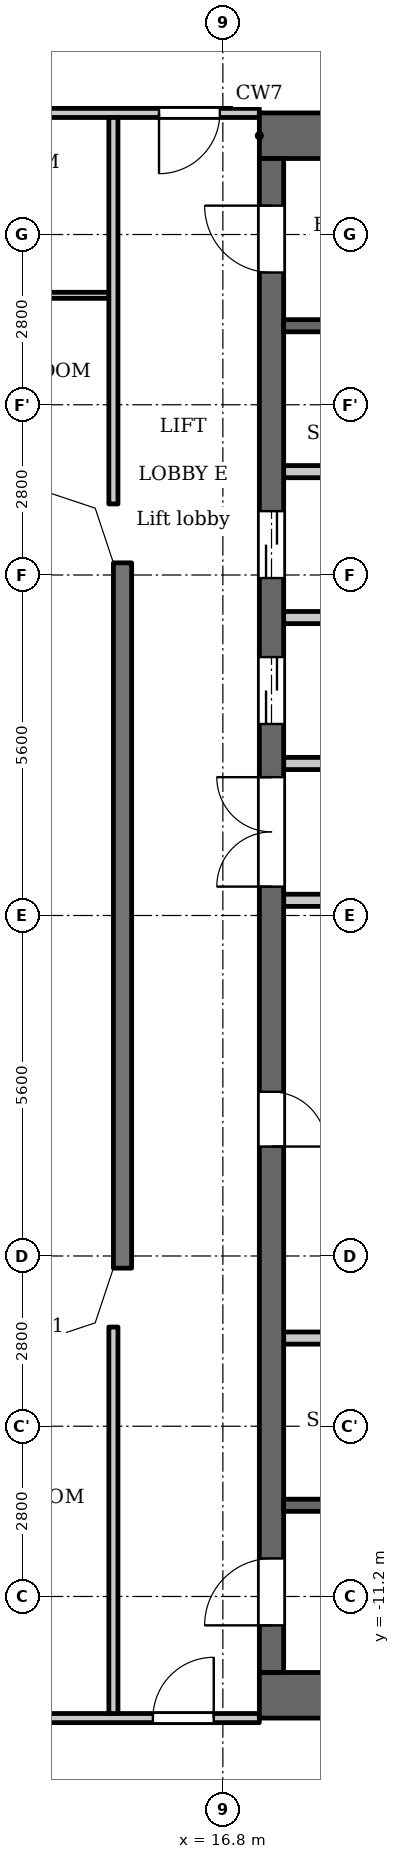
"""IFC4 building model, lengths in metres.
Left out: names, types, materials, properties, quantities, classifications, styles, units other than length and angle.
Written with IfcOpenShell. Run it as: python <this file> out.ifc"""

import sys

from ifc_helpers import new_model, si_unit, direction, frame, frame_2d, origin, place, context, subcontext, project, spatial, polyline, rectangle, outline, extrude, element, fill, save


model = new_model("IFC4")
c1 = context("Model", 3, precision=1e-05, world=origin(), true_north=direction((0.0, 1.0)))
c2 = subcontext(c1, "Body", "Model", "MODEL_VIEW")
j1 = project(units=[si_unit("LENGTHUNIT", "METRE"), si_unit("PLANEANGLEUNIT", "RADIAN")], contexts=[c1])
p1 = place(None, origin())
s1 = spatial("IfcSite", under=j1, at=p1, CompositionType="ELEMENT")
p2 = place(p1, origin())
s2 = spatial("IfcBuilding", under=s1, at=p2, CompositionType="ELEMENT")
p3 = place(p2, frame((0.0, 0.0, 213.4)))
s3 = spatial("IfcBuildingStorey", under=s2, at=p3, CompositionType="ELEMENT", Elevation=213.4)
p4 = place(p3, frame((15.15, 5.8, 0.0), z_axis=(0.0, 0.0, 1.0), x_axis=(0.0, -1.0, 0.0)))
e1 = element("IfcWall", 1, at=p4, inside=s3, PredefinedType="SOLIDWALL", context=c2, shape_type="SweptSolid", body=[
    extrude(rectangle(XDim=11.6, YDim=0.3, at=frame_2d((5.8, 0.0))), origin(), (0.0, 0.0, 1.0), 3.2),
])
for number, where, z_axis, x_axis in (
    (2, (17.4, 12.825, 0.0), (0.0, 0.0, 1.0), (1.0, 0.0, 0.0)),
    (3, (17.4, -12.825, 0.0), (0.0, 0.0, 1.0), (1.0, 0.0, 0.0)),
):
    element("IfcWall", number, at=place(p3, frame(where, z_axis=z_axis, x_axis=x_axis)), inside=s3, PredefinedType="SHEAR", context=c2, shape_type="SweptSolid", body=[
        extrude(rectangle(XDim=7.6, YDim=0.75, at=frame_2d((3.8, 0.0))), origin(), (0.0, 0.0, 1.0), 3.2),
    ])
p5 = place(p3, frame((17.6, -12.45, 0.0), z_axis=(0.0, 0.0, 1.0), x_axis=(0.0, 1.0, 0.0)))
e4 = element("IfcWall", 4, at=p5, inside=s3, PredefinedType="SHEAR", context=c2, shape_type="SweptSolid", body=[
    extrude(rectangle(XDim=24.9, YDim=0.4, at=frame_2d((12.45, 0.0))), origin(), (0.0, 0.0, 1.0), 3.2),
])
p6 = place(p5, frame((8.65, 0.0, 0.0)))
e5 = element("IfcOpeningElement", 5, at=p6, cuts=e4, PredefinedType="OPENING", context=c2, shape_type="SweptSolid", body=[
    extrude(rectangle(XDim=0.9, YDim=2.1, at=frame_2d((0.45, 1.05))), frame((0.0, 0.21, 0.0), z_axis=(0.0, -1.0, 0.0), x_axis=(1.0, 0.0, 0.0)), (0.0, 0.0, 1.0), 0.42),
])
p7 = place(p5, frame((15.6, 0.0, 0.0)))
e6 = element("IfcOpeningElement", 6, at=p7, cuts=e4, PredefinedType="OPENING", context=c2, shape_type="SweptSolid", body=[
    extrude(rectangle(XDim=1.1, YDim=2.1, at=frame_2d((0.55, 1.05))), frame((0.0, 0.21, 0.0), z_axis=(0.0, -1.0, 0.0), x_axis=(1.0, 0.0, 0.0)), (0.0, 0.0, 1.0), 0.42),
])
p8 = place(p5, frame((18.0, 0.0, 0.0)))
e7 = element("IfcOpeningElement", 7, at=p8, cuts=e4, PredefinedType="OPENING", context=c2, shape_type="SweptSolid", body=[
    extrude(rectangle(XDim=1.1, YDim=2.1, at=frame_2d((0.55, 1.05))), frame((0.0, 0.21, 0.0), z_axis=(0.0, -1.0, 0.0), x_axis=(1.0, 0.0, 0.0)), (0.0, 0.0, 1.0), 0.42),
])
p9 = place(p5, frame((23.025, 0.0, 0.0)))
e8 = element("IfcOpeningElement", 8, at=p9, cuts=e4, PredefinedType="OPENING", context=c2, shape_type="SweptSolid", body=[
    extrude(rectangle(XDim=1.1, YDim=2.1, at=frame_2d((0.55, 1.05))), frame((0.0, 0.21, 0.0), z_axis=(0.0, -1.0, 0.0), x_axis=(1.0, 0.0, 0.0)), (0.0, 0.0, 1.0), 0.42),
])
p10 = place(p5, frame((0.775, 0.0, 0.0)))
e9 = element("IfcOpeningElement", 9, at=p10, cuts=e4, PredefinedType="OPENING", context=c2, shape_type="SweptSolid", body=[
    extrude(rectangle(XDim=1.1, YDim=2.1, at=frame_2d((0.55, 1.05))), frame((0.0, 0.21, 0.0), z_axis=(0.0, -1.0, 0.0), x_axis=(1.0, 0.0, 0.0)), (0.0, 0.0, 1.0), 0.42),
])
p11 = place(p5, frame((12.925, 0.0, 0.0)))
e10 = element("IfcOpeningElement", 10, at=p11, cuts=e4, PredefinedType="OPENING", context=c2, shape_type="SweptSolid", body=[
    extrude(rectangle(XDim=1.8, YDim=2.1, at=frame_2d((0.9, 1.05))), frame((0.0, 0.21, 0.0), z_axis=(0.0, -1.0, 0.0), x_axis=(1.0, 0.0, 0.0)), (0.0, 0.0, 1.0), 0.42),
])
p12 = place(p3, frame((17.8, -9.7, 0.0), z_axis=(0.0, 0.0, 1.0), x_axis=(1.0, 0.0, 0.0)))
e11 = element("IfcWall", 11, at=p12, inside=s3, PredefinedType="SHEAR", context=c2, shape_type="SweptSolid", body=[
    extrude(rectangle(XDim=5.65, YDim=0.2, at=frame_2d((2.825, 0.0))), origin(), (0.0, 0.0, 1.0), 3.2),
])
p13 = place(p12, frame((0.85, 0.0, 0.0)))
e12 = element("IfcOpeningElement", 12, at=p13, cuts=e11, PredefinedType="OPENING", context=c2, shape_type="SweptSolid", body=[
    extrude(rectangle(XDim=1.1, YDim=2.1, at=frame_2d((0.55, 1.05))), frame((0.0, 0.11, 0.0), z_axis=(0.0, -1.0, 0.0), x_axis=(1.0, 0.0, 0.0)), (0.0, 0.0, 1.0), 0.22),
])
p14 = place(p12, frame((3.75, 0.0, 0.0)))
e13 = element("IfcOpeningElement", 13, at=p14, cuts=e11, PredefinedType="OPENING", context=c2, shape_type="SweptSolid", body=[
    extrude(rectangle(XDim=1.1, YDim=2.1, at=frame_2d((0.55, 1.05))), frame((0.0, 0.11, 0.0), z_axis=(0.0, -1.0, 0.0), x_axis=(1.0, 0.0, 0.0)), (0.0, 0.0, 1.0), 0.22),
])
p15 = place(p3, frame((17.8, -6.95, 0.0), z_axis=(0.0, 0.0, 1.0), x_axis=(1.0, 0.0, 0.0)))
e14 = element("IfcWall", 14, at=p15, inside=s3, PredefinedType="PARTITIONING", context=c2, shape_type="SweptSolid", body=[
    extrude(rectangle(XDim=2.8, YDim=0.2, at=frame_2d((1.4, 0.0))), origin(), (0.0, 0.0, 1.0), 3.2),
])
p16 = place(p3, frame((17.8, 0.25, 0.0), z_axis=(0.0, 0.0, 1.0), x_axis=(1.0, 0.0, 0.0)))
e15 = element("IfcWall", 15, at=p16, inside=s3, PredefinedType="PARTITIONING", context=c2, shape_type="SweptSolid", body=[
    extrude(rectangle(XDim=3.0, YDim=0.2, at=frame_2d((1.5, 0.0))), origin(), (0.0, 0.0, 1.0), 3.2),
])
p17 = place(p16, frame((1.98, 0.0, 0.0)))
e16 = element("IfcOpeningElement", 16, at=p17, cuts=e15, PredefinedType="OPENING", context=c2, shape_type="SweptSolid", body=[
    extrude(rectangle(XDim=0.9, YDim=2.1, at=frame_2d((0.45, 1.05))), frame((0.0, 0.11, 0.0), z_axis=(0.0, -1.0, 0.0), x_axis=(1.0, 0.0, 0.0)), (0.0, 0.0, 1.0), 0.22),
])
p18 = place(p3, frame((17.8, 2.5, 0.0), z_axis=(0.0, 0.0, 1.0), x_axis=(1.0, 0.0, 0.0)))
e17 = element("IfcWall", 17, at=p18, inside=s3, PredefinedType="PARTITIONING", context=c2, shape_type="SweptSolid", body=[
    extrude(rectangle(XDim=3.0, YDim=0.2, at=frame_2d((1.5, 0.0))), origin(), (0.0, 0.0, 1.0), 3.2),
])
for number, where, z_axis, x_axis in (
    (18, (17.8, 4.9, 0.0), (0.0, 0.0, 1.0), (1.0, 0.0, 0.0)),
    (19, (17.8, 7.3, 0.0), (0.0, 0.0, 1.0), (1.0, 0.0, 0.0)),
):
    element("IfcWall", number, at=place(p3, frame(where, z_axis=z_axis, x_axis=x_axis)), inside=s3, PredefinedType="PARTITIONING", context=c2, shape_type="SweptSolid", body=[
        extrude(rectangle(XDim=2.8, YDim=0.2, at=frame_2d((1.4, 0.0))), origin(), (0.0, 0.0, 1.0), 3.2),
    ])
p19 = place(p3, frame((17.8, 9.7, 0.0), z_axis=(0.0, 0.0, 1.0), x_axis=(1.0, 0.0, 0.0)))
e20 = element("IfcWall", 20, at=p19, inside=s3, PredefinedType="SHEAR", context=c2, shape_type="SweptSolid", body=[
    extrude(rectangle(XDim=5.65, YDim=0.2, at=frame_2d((2.825, 0.0))), origin(), (0.0, 0.0, 1.0), 3.2),
])
p20 = place(p19, frame((0.85, 0.0, 0.0)))
e21 = element("IfcOpeningElement", 21, at=p20, cuts=e20, PredefinedType="OPENING", context=c2, shape_type="SweptSolid", body=[
    extrude(rectangle(XDim=1.1, YDim=2.1, at=frame_2d((0.55, 1.05))), frame((0.0, 0.11, 0.0), z_axis=(0.0, -1.0, 0.0), x_axis=(1.0, 0.0, 0.0)), (0.0, 0.0, 1.0), 0.22),
])
p21 = place(p19, frame((3.75, 0.0, 0.0)))
e22 = element("IfcOpeningElement", 22, at=p21, cuts=e20, PredefinedType="OPENING", context=c2, shape_type="SweptSolid", body=[
    extrude(rectangle(XDim=1.1, YDim=2.1, at=frame_2d((0.55, 1.05))), frame((0.0, 0.11, 0.0), z_axis=(0.0, -1.0, 0.0), x_axis=(1.0, 0.0, 0.0)), (0.0, 0.0, 1.0), 0.22),
])
p22 = place(p3, frame((-17.4, -13.2, 0.0), z_axis=(0.0, 0.0, 1.0), x_axis=(1.0, 0.0, 0.0)))
e23 = element("IfcWall", 23, at=p22, inside=s3, PredefinedType="PARTITIONING", context=c2, shape_type="SweptSolid", body=[
    extrude(rectangle(XDim=34.8, YDim=0.15, at=frame_2d((17.4, 0.0))), origin(), (0.0, 0.0, 1.0), 3.2),
])
p23 = place(p22, frame((0.65, 0.0, 0.0)))
e24 = element("IfcOpeningElement", 24, at=p23, cuts=e23, PredefinedType="OPENING", context=c2, shape_type="SweptSolid", body=[
    extrude(rectangle(XDim=1.0, YDim=2.1, at=frame_2d((0.5, 1.05))), frame((0.0, 0.085, 0.0), z_axis=(0.0, -1.0, 0.0), x_axis=(1.0, 0.0, 0.0)), (0.0, 0.0, 1.0), 0.17),
])
p24 = place(p22, frame((33.05, 0.0, 0.0)))
e25 = element("IfcOpeningElement", 25, at=p24, cuts=e23, PredefinedType="OPENING", context=c2, shape_type="SweptSolid", body=[
    extrude(rectangle(XDim=1.0, YDim=2.1, at=frame_2d((0.5, 1.05))), frame((0.0, 0.085, 0.0), z_axis=(0.0, -1.0, 0.0), x_axis=(1.0, 0.0, 0.0)), (0.0, 0.0, 1.0), 0.17),
])
p25 = place(p22, frame((4.55, 0.0, 0.0)))
e26 = element("IfcOpeningElement", 26, at=p25, cuts=e23, PredefinedType="OPENING", context=c2, shape_type="SweptSolid", body=[
    extrude(rectangle(XDim=1.0, YDim=2.1, at=frame_2d((0.5, 1.05))), frame((0.0, 0.085, 0.0), z_axis=(0.0, -1.0, 0.0), x_axis=(1.0, 0.0, 0.0)), (0.0, 0.0, 1.0), 0.17),
])
p26 = place(p22, frame((6.9, 0.0, 0.0)))
e27 = element("IfcOpeningElement", 27, at=p26, cuts=e23, PredefinedType="OPENING", context=c2, shape_type="SweptSolid", body=[
    extrude(rectangle(XDim=1.0, YDim=2.1, at=frame_2d((0.5, 1.05))), frame((0.0, 0.085, 0.0), z_axis=(0.0, -1.0, 0.0), x_axis=(1.0, 0.0, 0.0)), (0.0, 0.0, 1.0), 0.17),
])
p27 = place(p22, frame((15.75, 0.0, 0.0)))
e28 = element("IfcOpeningElement", 28, at=p27, cuts=e23, PredefinedType="OPENING", context=c2, shape_type="SweptSolid", body=[
    extrude(rectangle(XDim=1.0, YDim=2.1, at=frame_2d((0.5, 1.05))), frame((0.0, 0.085, 0.0), z_axis=(0.0, -1.0, 0.0), x_axis=(1.0, 0.0, 0.0)), (0.0, 0.0, 1.0), 0.17),
])
p28 = place(p22, frame((18.1, 0.0, 0.0)))
e29 = element("IfcOpeningElement", 29, at=p28, cuts=e23, PredefinedType="OPENING", context=c2, shape_type="SweptSolid", body=[
    extrude(rectangle(XDim=1.0, YDim=2.1, at=frame_2d((0.5, 1.05))), frame((0.0, 0.085, 0.0), z_axis=(0.0, -1.0, 0.0), x_axis=(1.0, 0.0, 0.0)), (0.0, 0.0, 1.0), 0.17),
])
p29 = place(p22, frame((26.95, 0.0, 0.0)))
e30 = element("IfcOpeningElement", 30, at=p29, cuts=e23, PredefinedType="OPENING", context=c2, shape_type="SweptSolid", body=[
    extrude(rectangle(XDim=1.0, YDim=2.1, at=frame_2d((0.5, 1.05))), frame((0.0, 0.085, 0.0), z_axis=(0.0, -1.0, 0.0), x_axis=(1.0, 0.0, 0.0)), (0.0, 0.0, 1.0), 0.17),
])
p30 = place(p22, frame((29.25, 0.0, 0.0)))
e31 = element("IfcOpeningElement", 31, at=p30, cuts=e23, PredefinedType="OPENING", context=c2, shape_type="SweptSolid", body=[
    extrude(rectangle(XDim=1.0, YDim=2.1, at=frame_2d((0.5, 1.05))), frame((0.0, 0.085, 0.0), z_axis=(0.0, -1.0, 0.0), x_axis=(1.0, 0.0, 0.0)), (0.0, 0.0, 1.0), 0.17),
])
p31 = place(p3, frame((-14.925, 10.2, 0.0), z_axis=(0.0, 0.0, 1.0), x_axis=(1.0, 0.0, 0.0)))
e32 = element("IfcWall", 32, at=p31, inside=s3, PredefinedType="PARTITIONING", context=c2, shape_type="SweptSolid", body=[
    extrude(rectangle(XDim=29.85, YDim=0.1, at=frame_2d((14.925, 0.0))), origin(), (0.0, 0.0, 1.0), 3.2),
])
p32 = place(p31, frame((13.475, 0.0, 0.0)))
e33 = element("IfcOpeningElement", 33, at=p32, cuts=e32, PredefinedType="OPENING", context=c2, shape_type="SweptSolid", body=[
    extrude(rectangle(XDim=0.9, YDim=2.1, at=frame_2d((0.45, 1.05))), frame((0.0, 0.06, 0.0), z_axis=(0.0, -1.0, 0.0), x_axis=(1.0, 0.0, 0.0)), (0.0, 0.0, 1.0), 0.12),
])
p33 = place(p31, frame((4.375, 0.0, 0.0)))
e34 = element("IfcOpeningElement", 34, at=p33, cuts=e32, PredefinedType="OPENING", context=c2, shape_type="SweptSolid", body=[
    extrude(rectangle(XDim=0.9, YDim=2.1, at=frame_2d((0.45, 1.05))), frame((0.0, 0.06, 0.0), z_axis=(0.0, -1.0, 0.0), x_axis=(1.0, 0.0, 0.0)), (0.0, 0.0, 1.0), 0.12),
])
p34 = place(p31, frame((19.075, 0.0, 0.0)))
e35 = element("IfcOpeningElement", 35, at=p34, cuts=e32, PredefinedType="OPENING", context=c2, shape_type="SweptSolid", body=[
    extrude(rectangle(XDim=0.9, YDim=2.1, at=frame_2d((0.45, 1.05))), frame((0.0, 0.06, 0.0), z_axis=(0.0, -1.0, 0.0), x_axis=(1.0, 0.0, 0.0)), (0.0, 0.0, 1.0), 0.12),
])
p35 = place(p31, frame((21.175, 0.0, 0.0)))
e36 = element("IfcOpeningElement", 36, at=p35, cuts=e32, PredefinedType="OPENING", context=c2, shape_type="SweptSolid", body=[
    extrude(rectangle(XDim=0.9, YDim=2.1, at=frame_2d((0.45, 1.05))), frame((0.0, 0.06, 0.0), z_axis=(0.0, -1.0, 0.0), x_axis=(1.0, 0.0, 0.0)), (0.0, 0.0, 1.0), 0.12),
])
p36 = place(p3, frame((-17.4, 13.2, 0.0), z_axis=(0.0, 0.0, 1.0), x_axis=(1.0, 0.0, 0.0)))
e37 = element("IfcWall", 37, at=p36, inside=s3, PredefinedType="PARTITIONING", context=c2, shape_type="SweptSolid", body=[
    extrude(rectangle(XDim=34.8, YDim=0.15, at=frame_2d((17.4, 0.0))), origin(), (0.0, 0.0, 1.0), 3.2),
])
p37 = place(p36, frame((0.75, 0.0, 0.0)))
e38 = element("IfcOpeningElement", 38, at=p37, cuts=e37, PredefinedType="OPENING", context=c2, shape_type="SweptSolid", body=[
    extrude(rectangle(XDim=1.0, YDim=2.1, at=frame_2d((0.5, 1.05))), frame((0.0, 0.085, 0.0), z_axis=(0.0, -1.0, 0.0), x_axis=(1.0, 0.0, 0.0)), (0.0, 0.0, 1.0), 0.17),
])
p38 = place(p36, frame((33.15, 0.0, 0.0)))
e39 = element("IfcOpeningElement", 39, at=p38, cuts=e37, PredefinedType="OPENING", context=c2, shape_type="SweptSolid", body=[
    extrude(rectangle(XDim=1.0, YDim=2.1, at=frame_2d((0.5, 1.05))), frame((0.0, 0.085, 0.0), z_axis=(0.0, -1.0, 0.0), x_axis=(1.0, 0.0, 0.0)), (0.0, 0.0, 1.0), 0.17),
])
p39 = place(p36, frame((12.45, 0.0, 0.0)))
e40 = element("IfcOpeningElement", 40, at=p39, cuts=e37, PredefinedType="OPENING", context=c2, shape_type="SweptSolid", body=[
    extrude(rectangle(XDim=1.0, YDim=2.1, at=frame_2d((0.5, 1.05))), frame((0.0, 0.085, 0.0), z_axis=(0.0, -1.0, 0.0), x_axis=(1.0, 0.0, 0.0)), (0.0, 0.0, 1.0), 0.17),
])
p40 = place(p36, frame((18.05, 0.0, 0.0)))
e41 = element("IfcOpeningElement", 41, at=p40, cuts=e37, PredefinedType="OPENING", context=c2, shape_type="SweptSolid", body=[
    extrude(rectangle(XDim=1.0, YDim=2.1, at=frame_2d((0.5, 1.05))), frame((0.0, 0.085, 0.0), z_axis=(0.0, -1.0, 0.0), x_axis=(1.0, 0.0, 0.0)), (0.0, 0.0, 1.0), 0.17),
])
for number, where, z_axis, x_axis in (
    (42, (15.0, -13.125, 0.0), (0.0, 0.0, 1.0), (0.0, 1.0, 0.0)),
    (43, (15.0, 6.769, 0.0), (0.0, 0.0, 1.0), (0.0, 1.0, 0.0)),
):
    element("IfcWall", number, at=place(p3, frame(where, z_axis=z_axis, x_axis=x_axis)), inside=s3, PredefinedType="PARTITIONING", context=c2, shape_type="SweptSolid", body=[
        extrude(rectangle(XDim=6.356, YDim=0.15, at=frame_2d((3.178, 0.0))), origin(), (0.0, 0.0, 1.0), 3.2),
    ])
p41 = place(p3, origin())
e44 = element("IfcWall", 44, at=p41, inside=s3, PredefinedType="SOLIDWALL", context=c2, shape_type="SweptSolid", body=[
    extrude(outline(polyline([(14.937, 6.937), (13.849, 7.3), (13.8, 7.3), (13.8, 7.0), (14.7, 6.7), (15.0, 5.8), (15.3, 5.8), (15.3, 5.849), (14.937, 6.937)])), origin(), (0.0, 0.0, 1.0), 3.2),
])
e45 = element("IfcWall", 45, at=p41, inside=s3, PredefinedType="SOLIDWALL", context=c2, shape_type="SweptSolid", body=[
    extrude(outline(polyline([(14.937, -6.937), (15.3, -5.849), (15.3, -5.8), (15.0, -5.8), (14.7, -6.7), (13.8, -7.0), (13.8, -7.3), (13.849, -7.3), (14.937, -6.937)])), origin(), (0.0, 0.0, 1.0), 3.2),
])
p42 = place(p6, origin())
e46 = element("IfcDoor", 46, at=p42, inside=s3, OperationType="SINGLE_SWING_LEFT", PredefinedType="DOOR", context=c2, shape_type="SweptSolid", body=[
    extrude(rectangle(XDim=0.9, YDim=2.1, at=frame_2d((0.45, 1.05))), frame((0.0, 0.025, 0.0), z_axis=(0.0, -1.0, 0.0), x_axis=(1.0, 0.0, 0.0)), (0.0, 0.0, 1.0), 0.05),
])
fill(e5, e46)
p43 = place(p7, origin())
e47 = element("IfcDoor", 47, at=p43, inside=s3, OperationType="DOUBLE_DOOR_SLIDING", PredefinedType="DOOR", context=c2, shape_type="SweptSolid", body=[
    extrude(rectangle(XDim=1.1, YDim=2.1, at=frame_2d((0.55, 1.05))), frame((0.0, 0.025, 0.0), z_axis=(0.0, -1.0, 0.0), x_axis=(1.0, 0.0, 0.0)), (0.0, 0.0, 1.0), 0.05),
])
fill(e6, e47)
p44 = place(p8, origin())
e48 = element("IfcDoor", 48, at=p44, inside=s3, OperationType="DOUBLE_DOOR_SLIDING", PredefinedType="DOOR", context=c2, shape_type="SweptSolid", body=[
    extrude(rectangle(XDim=1.1, YDim=2.1, at=frame_2d((0.55, 1.05))), frame((0.0, 0.025, 0.0), z_axis=(0.0, -1.0, 0.0), x_axis=(1.0, 0.0, 0.0)), (0.0, 0.0, 1.0), 0.05),
])
fill(e7, e48)
p45 = place(p9, origin())
e49 = element("IfcDoor", 49, at=p45, inside=s3, OperationType="SINGLE_SWING_LEFT", PredefinedType="DOOR", context=c2, shape_type="SweptSolid", body=[
    extrude(rectangle(XDim=1.1, YDim=2.1, at=frame_2d((0.55, 1.05))), frame((0.0, 0.025, 0.0), z_axis=(0.0, -1.0, 0.0), x_axis=(1.0, 0.0, 0.0)), (0.0, 0.0, 1.0), 0.05),
])
fill(e8, e49)
p46 = place(p10, origin())
e50 = element("IfcDoor", 50, at=p46, inside=s3, OperationType="SINGLE_SWING_RIGHT", PredefinedType="DOOR", context=c2, shape_type="SweptSolid", body=[
    extrude(rectangle(XDim=1.1, YDim=2.1, at=frame_2d((0.55, 1.05))), frame((0.0, 0.025, 0.0), z_axis=(0.0, -1.0, 0.0), x_axis=(1.0, 0.0, 0.0)), (0.0, 0.0, 1.0), 0.05),
])
fill(e9, e50)
p47 = place(p11, origin())
e51 = element("IfcDoor", 51, at=p47, inside=s3, OperationType="DOUBLE_DOOR_SINGLE_SWING", PredefinedType="DOOR", context=c2, shape_type="SweptSolid", body=[
    extrude(rectangle(XDim=1.8, YDim=2.1, at=frame_2d((0.9, 1.05))), frame((0.0, 0.025, 0.0), z_axis=(0.0, -1.0, 0.0), x_axis=(1.0, 0.0, 0.0)), (0.0, 0.0, 1.0), 0.05),
])
fill(e10, e51)
p48 = place(p38, origin())
e52 = element("IfcDoor", 52, at=p48, inside=s3, OperationType="SINGLE_SWING_LEFT", PredefinedType="DOOR", context=c2, shape_type="SweptSolid", body=[
    extrude(rectangle(XDim=1.0, YDim=2.1, at=frame_2d((0.5, 1.05))), frame((0.0, 0.025, 0.0), z_axis=(0.0, -1.0, 0.0), x_axis=(1.0, 0.0, 0.0)), (0.0, 0.0, 1.0), 0.05),
])
fill(e39, e52)
p49 = place(p24, origin())
e53 = element("IfcDoor", 53, at=p49, inside=s3, OperationType="SINGLE_SWING_LEFT", PredefinedType="DOOR", context=c2, shape_type="SweptSolid", body=[
    extrude(rectangle(XDim=1.0, YDim=2.1, at=frame_2d((0.5, 1.05))), frame((0.0, 0.025, 0.0), z_axis=(0.0, -1.0, 0.0), x_axis=(1.0, 0.0, 0.0)), (0.0, 0.0, 1.0), 0.05),
])
fill(e25, e53)
save(model, sys.argv[1])
